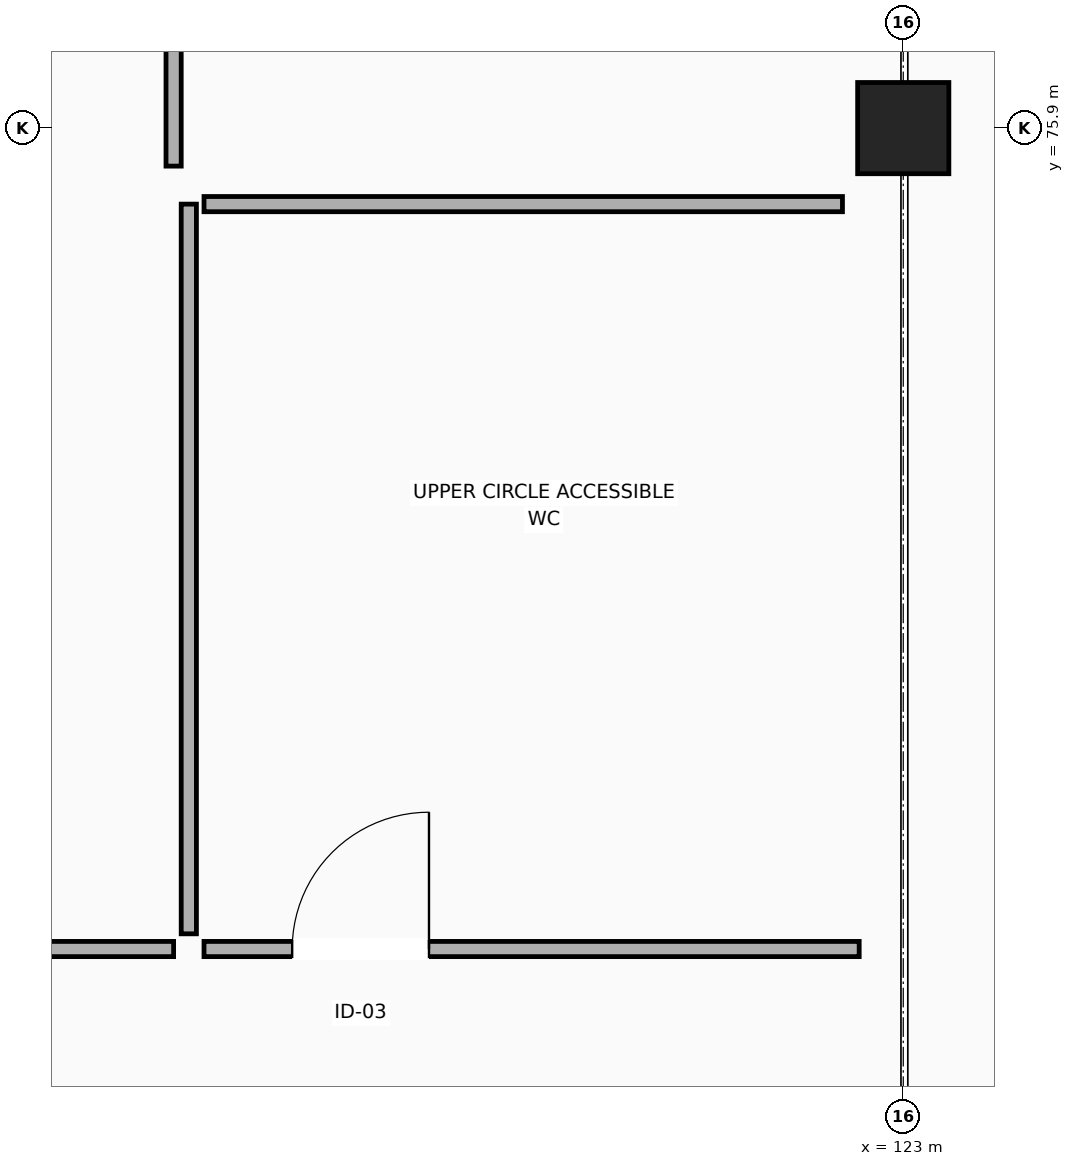
"""IFC4 building model, lengths in metres.
Left out: names, types, materials, properties, quantities, classifications, styles, units other than length and angle.
Written with IfcOpenShell. Run it as: python <this file> out.ifc"""

import sys

from ifc_helpers import new_model, si_unit, direction, frame, frame_2d, origin, origin_2d, place, context, subcontext, project, spatial, rectangle, extrude, element, fill, save


model = new_model("IFC4")
c1 = context("Model", 3, precision=1e-05, world=origin(), true_north=direction((0.0, 1.0)))
c2 = subcontext(c1, "Body", "Model", "MODEL_VIEW")
j1 = project(units=[si_unit("LENGTHUNIT", "METRE"), si_unit("PLANEANGLEUNIT", "RADIAN")], contexts=[c1])
p1 = place(None, origin())
s1 = spatial("IfcSite", under=j1, at=p1, CompositionType="ELEMENT")
p2 = place(p1, origin())
s2 = spatial("IfcBuilding", under=s1, at=p2, CompositionType="ELEMENT")
p3 = place(p2, frame((0.0, 0.0, 10.2)))
s3 = spatial("IfcBuildingStorey", under=s2, at=p3, CompositionType="ELEMENT", Elevation=10.2)
p4 = place(p3, frame((123.0, 75.9, 0.0), z_axis=(0.0, 0.0, 1.0), x_axis=(1.0, 0.0, 0.0)))
e1 = element("IfcColumn", 1, at=p4, inside=s3, PredefinedType="COLUMN", context=c2, shape_type="SweptSolid", body=[
    extrude(rectangle(XDim=0.6, YDim=0.6, at=origin_2d()), origin(), (0.0, 0.0, 1.0), 4.5),
])
p5 = place(p3, frame((110.6, 70.5, 0.0), z_axis=(0.0, 0.0, 1.0), x_axis=(1.0, 0.0, 0.0)))
e2 = element("IfcWall", 2, at=p5, inside=s3, PredefinedType="PARTITIONING", context=c2, shape_type="SweptSolid", body=[
    extrude(rectangle(XDim=7.6, YDim=0.1, at=frame_2d((3.8, 0.0))), origin(), (0.0, 0.0, 1.0), 3.807),
])
p6 = place(p5, frame((0.58, 0.0, 0.0)))
e3 = element("IfcOpeningElement", 3, at=p6, cuts=e2, PredefinedType="OPENING", context=c2, shape_type="SweptSolid", body=[
    extrude(rectangle(XDim=0.9, YDim=2.1, at=frame_2d((0.45, 1.05))), frame((0.0, 0.06, 0.0), z_axis=(0.0, -1.0, 0.0), x_axis=(1.0, 0.0, 0.0)), (0.0, 0.0, 1.0), 0.12),
])
p7 = place(p3, frame((118.4, 70.5, 0.0), z_axis=(0.0, 0.0, 1.0), x_axis=(1.0, 0.0, 0.0)))
e4 = element("IfcWall", 4, at=p7, inside=s3, PredefinedType="PARTITIONING", context=c2, shape_type="SweptSolid", body=[
    extrude(rectangle(XDim=4.31, YDim=0.1, at=frame_2d((2.155, 0.0))), origin(), (0.0, 0.0, 1.0), 3.757),
])
p8 = place(p7, frame((0.58, 0.0, 0.0)))
e5 = element("IfcOpeningElement", 5, at=p8, cuts=e4, PredefinedType="OPENING", context=c2, shape_type="SweptSolid", body=[
    extrude(rectangle(XDim=0.9, YDim=2.1, at=frame_2d((0.45, 1.05))), frame((0.0, 0.06, 0.0), z_axis=(0.0, -1.0, 0.0), x_axis=(1.0, 0.0, 0.0)), (0.0, 0.0, 1.0), 0.12),
])
p9 = place(p3, frame((118.3, 70.6, 0.0), z_axis=(0.0, 0.0, 1.0), x_axis=(0.0, 1.0, 0.0)))
e6 = element("IfcWall", 6, at=p9, inside=s3, PredefinedType="PARTITIONING", context=c2, shape_type="SweptSolid", body=[
    extrude(rectangle(XDim=4.8, YDim=0.1, at=frame_2d((2.4, 0.0))), origin(), (0.0, 0.0, 1.0), 4.205),
])
p10 = place(p3, frame((118.2, 75.65, 0.0), z_axis=(0.0, 0.0, 1.0), x_axis=(0.0, 1.0, 0.0)))
e7 = element("IfcWall", 7, at=p10, inside=s3, PredefinedType="PARTITIONING", context=c2, shape_type="SweptSolid", body=[
    extrude(rectangle(XDim=7.15, YDim=0.1, at=frame_2d((3.575, 0.0))), origin(), (0.0, 0.0, 1.0), 3.407),
])
p11 = place(p3, frame((118.4, 75.4, 0.0), z_axis=(0.0, 0.0, 1.0), x_axis=(1.0, 0.0, 0.0)))
e8 = element("IfcWall", 8, at=p11, inside=s3, PredefinedType="PARTITIONING", context=c2, shape_type="SweptSolid", body=[
    extrude(rectangle(XDim=4.2, YDim=0.1, at=frame_2d((2.1, 0.0))), origin(), (0.0, 0.0, 1.0), 3.757),
])
p12 = place(p8, origin())
e9 = element("IfcDoor", 9, at=p12, inside=s3, OperationType="SINGLE_SWING_RIGHT", PredefinedType="DOOR", context=c2, shape_type="SweptSolid", body=[
    extrude(rectangle(XDim=0.9, YDim=2.1, at=frame_2d((0.45, 1.05))), frame((0.0, 0.025, 0.0), z_axis=(0.0, -1.0, 0.0), x_axis=(1.0, 0.0, 0.0)), (0.0, 0.0, 1.0), 0.05),
])
fill(e5, e9)
save(model, sys.argv[1])
